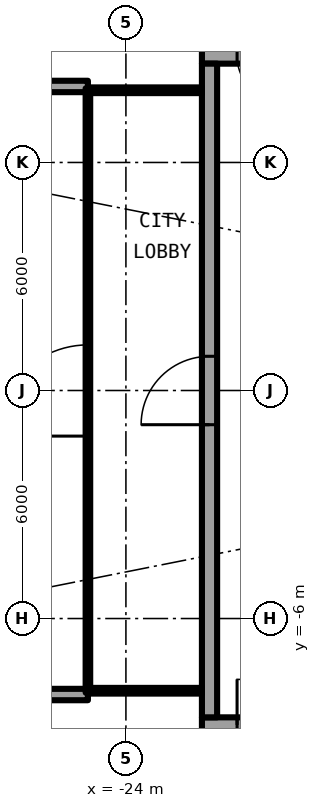
"""IFC4 building model, lengths in metres.
Left out: names, types, materials, properties, quantities, classifications, styles, units other than length and angle.
Written with IfcOpenShell. Run it as: python <this file> out.ifc"""

import sys

from ifc_helpers import new_model, si_unit, direction, frame, frame_2d, origin, place, context, subcontext, project, spatial, rectangle, extrude, element, fill, save


model = new_model("IFC4")
c1 = context("Model", 3, precision=1e-05, world=origin(), true_north=direction((0.0, 1.0)))
c2 = subcontext(c1, "Body", "Model", "MODEL_VIEW")
j1 = project(units=[si_unit("LENGTHUNIT", "METRE"), si_unit("PLANEANGLEUNIT", "RADIAN")], contexts=[c1])
p1 = place(None, origin())
s1 = spatial("IfcSite", under=j1, at=p1, CompositionType="ELEMENT")
p2 = place(p1, origin())
s2 = spatial("IfcBuilding", under=s1, at=p2, CompositionType="ELEMENT")
p3 = place(p2, frame((0.0, 0.0, 227.95)))
s3 = spatial("IfcBuildingStorey", under=s2, at=p3, CompositionType="ELEMENT", Elevation=227.95)
for number, where, z_axis, x_axis in (
    (1, (-25.0, 8.0, 0.0), (0.0, 0.0, 1.0), (-1.0, 0.0, 0.0)),
    (2, (-25.0, -8.0, 0.0), (0.0, 0.0, 1.0), (-1.0, 0.0, 0.0)),
):
    element("IfcWall", number, at=place(p3, frame(where, z_axis=z_axis, x_axis=x_axis)), inside=s3, PredefinedType="SOLIDWALL", context=c2, shape_type="SweptSolid", body=[
        extrude(rectangle(XDim=2.667, YDim=0.3, at=frame_2d((1.333, 0.0))), origin(), (0.0, 0.0, 1.0), 2.7),
    ])
p4 = place(p3, frame((-22.0, -8.8, 0.0), z_axis=(0.0, 0.0, 1.0), x_axis=(1.0, 0.0, 0.0)))
e3 = element("IfcWall", 3, at=p4, inside=s3, PredefinedType="SHEAR", context=c2, shape_type="SweptSolid", body=[
    extrude(rectangle(XDim=13.4, YDim=0.4, at=frame_2d((6.7, 0.0))), origin(), (0.0, 0.0, 1.0), 3.05),
])
p5 = place(p4, frame((0.925, 0.0, 0.0)))
e4 = element("IfcOpeningElement", 4, at=p5, cuts=e3, PredefinedType="OPENING", context=c2, shape_type="SweptSolid", body=[
    extrude(rectangle(XDim=1.2, YDim=2.3, at=frame_2d((0.6, 1.15))), frame((0.0, 0.21, 0.0), z_axis=(0.0, -1.0, 0.0), x_axis=(1.0, 0.0, 0.0)), (0.0, 0.0, 1.0), 0.42),
])
p6 = place(p3, frame((-8.6, 8.8, 0.0), z_axis=(0.0, 0.0, 1.0), x_axis=(-1.0, 0.0, 0.0)))
e5 = element("IfcWall", 5, at=p6, inside=s3, PredefinedType="SHEAR", context=c2, shape_type="SweptSolid", body=[
    extrude(rectangle(XDim=13.4, YDim=0.4, at=frame_2d((6.7, 0.0))), origin(), (0.0, 0.0, 1.0), 3.05),
])
p7 = place(p6, frame((11.275, 0.0, 0.0)))
e6 = element("IfcOpeningElement", 6, at=p7, cuts=e5, PredefinedType="OPENING", context=c2, shape_type="SweptSolid", body=[
    extrude(rectangle(XDim=1.2, YDim=2.3, at=frame_2d((0.6, 1.15))), frame((0.0, 0.21, 0.0), z_axis=(0.0, -1.0, 0.0), x_axis=(1.0, 0.0, 0.0)), (0.0, 0.0, 1.0), 0.42),
])
p8 = place(p3, frame((-21.8, -8.6, 0.0), z_axis=(0.0, 0.0, 1.0), x_axis=(0.0, 1.0, 0.0)))
e7 = element("IfcWall", 7, at=p8, inside=s3, PredefinedType="SHEAR", context=c2, shape_type="SweptSolid", body=[
    extrude(rectangle(XDim=17.2, YDim=0.4, at=frame_2d((8.6, 0.0))), origin(), (0.0, 0.0, 1.0), 3.05),
])
p9 = place(p8, frame((7.7, 0.0, 0.0)))
e8 = element("IfcOpeningElement", 8, at=p9, cuts=e7, PredefinedType="OPENING", context=c2, shape_type="SweptSolid", body=[
    extrude(rectangle(XDim=1.8, YDim=2.3, at=frame_2d((0.9, 1.15))), frame((0.0, 0.21, 0.0), z_axis=(0.0, -1.0, 0.0), x_axis=(1.0, 0.0, 0.0)), (0.0, 0.0, 1.0), 0.42),
])
for number, where, z_axis, x_axis in (
    (9, (-22.0, 7.9, 0.0), (0.0, 0.0, 1.0), (-1.0, 0.0, 0.0)),
    (10, (-22.0, -7.9, 0.0), (0.0, 0.0, 1.0), (-1.0, 0.0, 0.0)),
):
    element("IfcWall", number, at=place(p3, frame(where, z_axis=z_axis, x_axis=x_axis)), inside=s3, PredefinedType="PARTITIONING", context=c2, shape_type="SweptSolid", body=[
        extrude(rectangle(XDim=2.94, YDim=0.15, at=frame_2d((1.47, 0.0))), origin(), (0.0, 0.0, 1.0), 2.7),
    ])
p10 = place(p3, frame((-25.0, -7.95, 0.0), z_axis=(0.0, 0.0, 1.0), x_axis=(0.0, 1.0, 0.0)))
e11 = element("IfcWall", 11, at=p10, inside=s3, PredefinedType="PARTITIONING", context=c2, shape_type="SweptSolid", body=[
    extrude(rectangle(XDim=15.9, YDim=0.12, at=frame_2d((7.95, 0.0))), origin(), (0.0, 0.0, 1.0), 2.7),
])
p11 = place(p10, frame((6.75, 0.0, 0.0)))
e12 = element("IfcOpeningElement", 12, at=p11, cuts=e11, PredefinedType="OPENING", context=c2, shape_type="SweptSolid", body=[
    extrude(rectangle(XDim=2.4, YDim=2.3, at=frame_2d((1.2, 1.15))), frame((0.0, 0.07, 0.0), z_axis=(0.0, -1.0, 0.0), x_axis=(1.0, 0.0, 0.0)), (0.0, 0.0, 1.0), 0.14),
])
p12 = place(p10, frame((11.55, 0.0, 0.1)))
e13 = element("IfcOpeningElement", 13, at=p12, cuts=e11, PredefinedType="OPENING", context=c2, shape_type="SweptSolid", body=[
    extrude(rectangle(XDim=3.4, YDim=2.35, at=frame_2d((1.7, 1.175))), frame((0.0, 0.07, 0.0), z_axis=(0.0, -1.0, 0.0), x_axis=(1.0, 0.0, 0.0)), (0.0, 0.0, 1.0), 0.14),
])
p13 = place(p10, frame((0.95, 0.0, 0.1)))
e14 = element("IfcOpeningElement", 14, at=p13, cuts=e11, PredefinedType="OPENING", context=c2, shape_type="SweptSolid", body=[
    extrude(rectangle(XDim=3.4, YDim=2.35, at=frame_2d((1.7, 1.175))), frame((0.0, 0.07, 0.0), z_axis=(0.0, -1.0, 0.0), x_axis=(1.0, 0.0, 0.0)), (0.0, 0.0, 1.0), 0.14),
])
p14 = place(p5, origin())
e15 = element("IfcDoor", 15, at=p14, inside=s3, OperationType="SINGLE_SWING_RIGHT", PredefinedType="DOOR", context=c2, shape_type="SweptSolid", body=[
    extrude(rectangle(XDim=1.2, YDim=2.3, at=frame_2d((0.6, 1.15))), frame((0.0, 0.025, 0.0), z_axis=(0.0, -1.0, 0.0), x_axis=(1.0, 0.0, 0.0)), (0.0, 0.0, 1.0), 0.05),
])
fill(e4, e15)
p15 = place(p7, origin())
e16 = element("IfcDoor", 16, at=p15, inside=s3, OperationType="SINGLE_SWING_LEFT", PredefinedType="DOOR", context=c2, shape_type="SweptSolid", body=[
    extrude(rectangle(XDim=1.2, YDim=2.3, at=frame_2d((0.6, 1.15))), frame((0.0, 0.025, 0.0), z_axis=(0.0, -1.0, 0.0), x_axis=(1.0, 0.0, 0.0)), (0.0, 0.0, 1.0), 0.05),
])
fill(e6, e16)
p16 = place(p9, origin())
e17 = element("IfcDoor", 17, at=p16, inside=s3, OperationType="SINGLE_SWING_LEFT", PredefinedType="DOOR", context=c2, shape_type="SweptSolid", body=[
    extrude(rectangle(XDim=1.8, YDim=2.3, at=frame_2d((0.9, 1.15))), frame((0.0, 0.025, 0.0), z_axis=(0.0, -1.0, 0.0), x_axis=(1.0, 0.0, 0.0)), (0.0, 0.0, 1.0), 0.05),
])
fill(e8, e17)
p17 = place(p11, origin())
e18 = element("IfcDoor", 18, at=p17, inside=s3, OperationType="SINGLE_SWING_LEFT", PredefinedType="DOOR", context=c2, shape_type="SweptSolid", body=[
    extrude(rectangle(XDim=2.4, YDim=2.3, at=frame_2d((1.2, 1.15))), frame((0.0, 0.025, 0.0), z_axis=(0.0, -1.0, 0.0), x_axis=(1.0, 0.0, 0.0)), (0.0, 0.0, 1.0), 0.05),
])
fill(e12, e18)
p18 = place(p12, origin())
e19 = element("IfcWindow", 19, at=p18, inside=s3, PartitioningType="SINGLE_PANEL", PredefinedType="WINDOW", context=c2, shape_type="SweptSolid", body=[
    extrude(rectangle(XDim=3.4, YDim=2.35, at=frame_2d((1.7, 1.175))), frame((0.0, 0.03, 0.0), z_axis=(0.0, -1.0, 0.0), x_axis=(1.0, 0.0, 0.0)), (0.0, 0.0, 1.0), 0.06),
])
fill(e13, e19)
p19 = place(p13, origin())
e20 = element("IfcWindow", 20, at=p19, inside=s3, PartitioningType="SINGLE_PANEL", PredefinedType="WINDOW", context=c2, shape_type="SweptSolid", body=[
    extrude(rectangle(XDim=3.4, YDim=2.35, at=frame_2d((1.7, 1.175))), frame((0.0, 0.03, 0.0), z_axis=(0.0, -1.0, 0.0), x_axis=(1.0, 0.0, 0.0)), (0.0, 0.0, 1.0), 0.06),
])
fill(e14, e20)
save(model, sys.argv[1])
